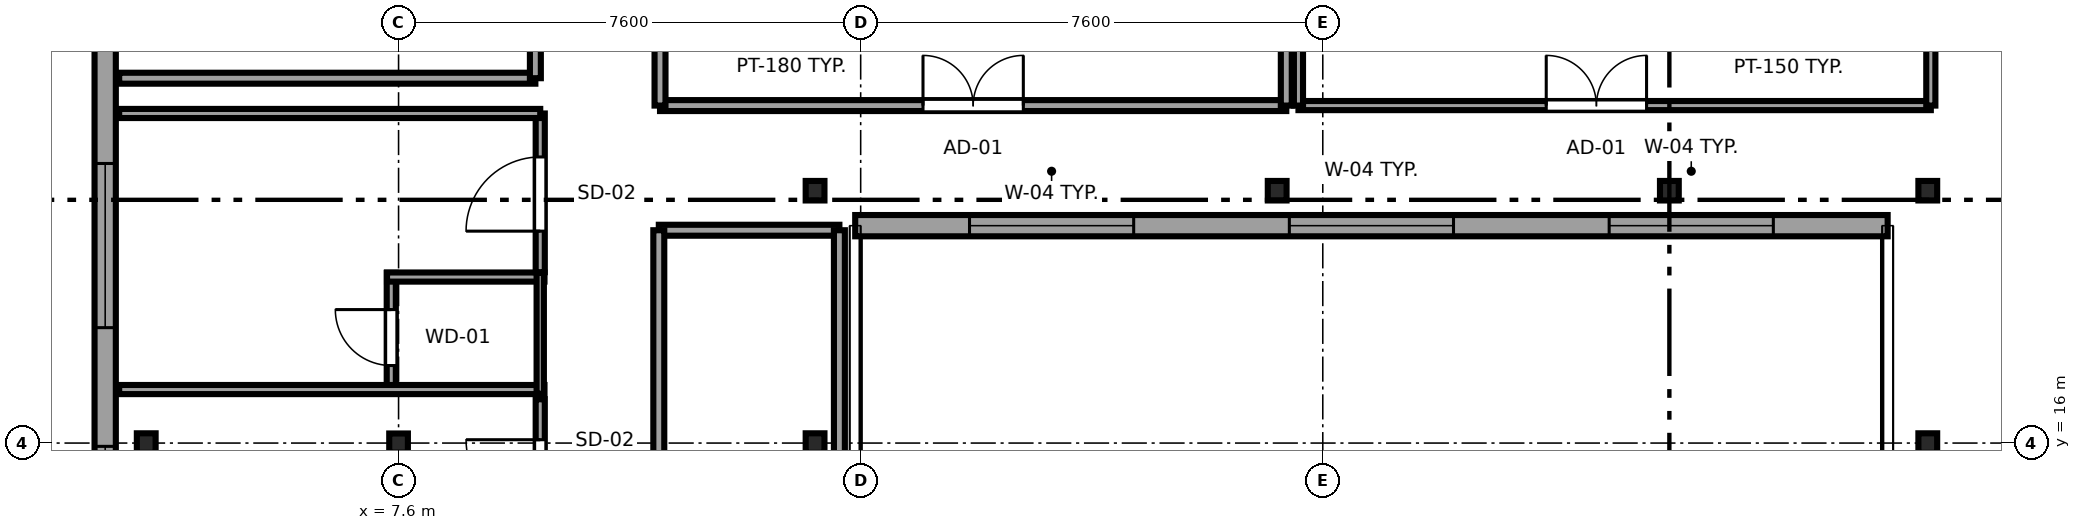
"""IFC4 building model, lengths in metres.
Left out: names, types, materials, properties, quantities, classifications, styles, units other than length and angle.
Written with IfcOpenShell. Run it as: python <this file> out.ifc"""

import sys

from ifc_helpers import new_model, si_unit, direction, frame, frame_2d, origin, origin_2d, place, context, subcontext, project, spatial, rectangle, i_section, extrude, source, transform, mapped, element, fill, save


model = new_model("IFC4")
c1 = context("Model", 3, precision=1e-05, world=origin(), true_north=direction((0.0, 1.0)))
c2 = subcontext(c1, "Body", "Model", "MODEL_VIEW")
j1 = project(units=[si_unit("LENGTHUNIT", "METRE"), si_unit("PLANEANGLEUNIT", "RADIAN")], contexts=[c1])
p1 = place(None, origin())
s1 = spatial("IfcSite", under=j1, at=p1, CompositionType="ELEMENT")
p2 = place(p1, origin())
s2 = spatial("IfcBuilding", under=s1, at=p2, CompositionType="ELEMENT")
p3 = place(p2, frame((0.0, 0.0, 245.2)))
s3 = spatial("IfcBuildingStorey", under=s2, at=p3, CompositionType="ELEMENT", Elevation=245.2)
m1 = source(origin(), c2, "Body", "SweptSolid", [
    extrude(i_section(OverallWidth=0.309, OverallDepth=0.321, WebThickness=0.014, FlangeThickness=0.022, FilletRadius=0.017, at=origin_2d()), origin(), (0.0, 0.0, 1.0), 3.55),
])
p4 = place(p3, frame((3.45, 16.0, 0.0), z_axis=(0.0, 0.0, 1.0), x_axis=(1.0, 0.0, 0.0)))
e1 = element("IfcColumn", 1, at=p4, inside=s3, PredefinedType="COLUMN", context=c2, shape_type="MappedRepresentation", body=[
    mapped(m1, transform((0.0, 0.0, 0.0), x_axis=(1.0, 0.0, 0.0), y_axis=(0.0, 1.0, 0.0), z_axis=(0.0, 0.0, 1.0), scale=1.0)),
])
m2 = source(origin(), c2, "Body", "SweptSolid", [
    extrude(i_section(OverallWidth=0.307, OverallDepth=0.315, WebThickness=0.012, FlangeThickness=0.019, FilletRadius=0.017, at=origin_2d()), origin(), (0.0, 0.0, 1.0), 3.55),
])
p5 = place(p3, frame((7.6, 16.0, 0.0), z_axis=(0.0, 0.0, 1.0), x_axis=(1.0, 0.0, 0.0)))
e2 = element("IfcColumn", 2, at=p5, inside=s3, PredefinedType="COLUMN", context=c2, shape_type="MappedRepresentation", body=[
    mapped(m2, transform((0.0, 0.0, 0.0), x_axis=(1.0, 0.0, 0.0), y_axis=(0.0, 1.0, 0.0), z_axis=(0.0, 0.0, 1.0), scale=1.0)),
])
for number, where, z_axis, x_axis in (
    (3, (14.45, 16.0, 0.0), (0.0, 0.0, 1.0), (1.0, 0.0, 0.0)),
    (4, (32.75, 16.0, 0.0), (0.0, 0.0, 1.0), (1.0, 0.0, 0.0)),
    (5, (14.45, 20.15, 0.0), (0.0, 0.0, 1.0), (1.0, 0.0, 0.0)),
    (6, (22.05, 20.15, 0.0), (0.0, 0.0, 1.0), (1.0, 0.0, 0.0)),
    (7, (28.5, 20.15, 0.0), (0.0, 0.0, 1.0), (1.0, 0.0, 0.0)),
    (8, (32.75, 20.15, 0.0), (0.0, 0.0, 1.0), (1.0, 0.0, 0.0)),
):
    element("IfcColumn", number, at=place(p3, frame(where, z_axis=z_axis, x_axis=x_axis)), inside=s3, PredefinedType="COLUMN", context=c2, shape_type="MappedRepresentation", body=[
        mapped(m1, transform((0.0, 0.0, 0.0), x_axis=(1.0, 0.0, 0.0), y_axis=(0.0, 1.0, 0.0), z_axis=(0.0, 0.0, 1.0), scale=1.0)),
    ])
p6 = place(p3, frame((15.11, 19.575, 0.0), z_axis=(0.0, 0.0, 1.0), x_axis=(1.0, 0.0, 0.0)))
e9 = element("IfcWall", 9, at=p6, inside=s3, PredefinedType="SOLIDWALL", context=c2, shape_type="SweptSolid", body=[
    extrude(rectangle(XDim=16.98, YDim=0.35, at=frame_2d((8.49, 0.0))), origin(), (0.0, 0.0, 1.0), 3.37),
])
p7 = place(p6, frame((1.88, 0.0, 0.68)))
e10 = element("IfcOpeningElement", 10, at=p7, cuts=e9, PredefinedType="OPENING", context=c2, shape_type="SweptSolid", body=[
    extrude(rectangle(XDim=2.7, YDim=1.95, at=frame_2d((1.35, 0.975))), frame((0.0, 0.185, 0.0), z_axis=(0.0, -1.0, 0.0), x_axis=(1.0, 0.0, 0.0)), (0.0, 0.0, 1.0), 0.37),
])
p8 = place(p6, frame((7.14, 0.0, 0.68)))
e11 = element("IfcOpeningElement", 11, at=p8, cuts=e9, PredefinedType="OPENING", context=c2, shape_type="SweptSolid", body=[
    extrude(rectangle(XDim=2.7, YDim=1.95, at=frame_2d((1.35, 0.975))), frame((0.0, 0.185, 0.0), z_axis=(0.0, -1.0, 0.0), x_axis=(1.0, 0.0, 0.0)), (0.0, 0.0, 1.0), 0.37),
])
p9 = place(p6, frame((12.4, 0.0, 0.68)))
e12 = element("IfcOpeningElement", 12, at=p9, cuts=e9, PredefinedType="OPENING", context=c2, shape_type="SweptSolid", body=[
    extrude(rectangle(XDim=2.7, YDim=1.95, at=frame_2d((1.35, 0.975))), frame((0.0, 0.185, 0.0), z_axis=(0.0, -1.0, 0.0), x_axis=(1.0, 0.0, 0.0)), (0.0, 0.0, 1.0), 0.37),
])
p10 = place(p3, frame((2.775, 40.783, 0.0), z_axis=(0.0, 0.0, 1.0), x_axis=(0.0, -1.0, 0.0)))
e13 = element("IfcWall", 13, at=p10, inside=s3, PredefinedType="SOLIDWALL", context=c2, shape_type="SweptSolid", body=[
    extrude(rectangle(XDim=33.766, YDim=0.35, at=frame_2d((16.883, 0.0))), origin(), (0.0, 0.0, 1.0), 3.37),
])
p11 = place(p10, frame((1.576, 0.0, 0.68)))
e14 = element("IfcOpeningElement", 14, at=p11, cuts=e13, PredefinedType="OPENING", context=c2, shape_type="SweptSolid", body=[
    extrude(rectangle(XDim=2.7, YDim=1.95, at=frame_2d((1.35, 0.975))), frame((0.0, 0.185, 0.0), z_axis=(0.0, -1.0, 0.0), x_axis=(1.0, 0.0, 0.0)), (0.0, 0.0, 1.0), 0.37),
])
p12 = place(p10, frame((6.228, 0.0, 0.68)))
e15 = element("IfcOpeningElement", 15, at=p12, cuts=e13, PredefinedType="OPENING", context=c2, shape_type="SweptSolid", body=[
    extrude(rectangle(XDim=2.7, YDim=1.95, at=frame_2d((1.35, 0.975))), frame((0.0, 0.185, 0.0), z_axis=(0.0, -1.0, 0.0), x_axis=(1.0, 0.0, 0.0)), (0.0, 0.0, 1.0), 0.37),
])
p13 = place(p10, frame((11.431, 0.0, 0.68)))
e16 = element("IfcOpeningElement", 16, at=p13, cuts=e13, PredefinedType="OPENING", context=c2, shape_type="SweptSolid", body=[
    extrude(rectangle(XDim=2.7, YDim=1.95, at=frame_2d((1.35, 0.975))), frame((0.0, 0.185, 0.0), z_axis=(0.0, -1.0, 0.0), x_axis=(1.0, 0.0, 0.0)), (0.0, 0.0, 1.0), 0.37),
])
p14 = place(p10, frame((15.533, 0.0, 0.68)))
e17 = element("IfcOpeningElement", 17, at=p14, cuts=e13, PredefinedType="OPENING", context=c2, shape_type="SweptSolid", body=[
    extrude(rectangle(XDim=2.7, YDim=1.95, at=frame_2d((1.35, 0.975))), frame((0.0, 0.185, 0.0), z_axis=(0.0, -1.0, 0.0), x_axis=(1.0, 0.0, 0.0)), (0.0, 0.0, 1.0), 0.37),
])
p15 = place(p10, frame((20.185, 0.0, 0.68)))
e18 = element("IfcOpeningElement", 18, at=p15, cuts=e13, PredefinedType="OPENING", context=c2, shape_type="SweptSolid", body=[
    extrude(rectangle(XDim=2.7, YDim=1.95, at=frame_2d((1.35, 0.975))), frame((0.0, 0.185, 0.0), z_axis=(0.0, -1.0, 0.0), x_axis=(1.0, 0.0, 0.0)), (0.0, 0.0, 1.0), 0.37),
])
p16 = place(p10, frame((24.837, 0.0, 0.68)))
e19 = element("IfcOpeningElement", 19, at=p16, cuts=e13, PredefinedType="OPENING", context=c2, shape_type="SweptSolid", body=[
    extrude(rectangle(XDim=2.7, YDim=1.95, at=frame_2d((1.35, 0.975))), frame((0.0, 0.185, 0.0), z_axis=(0.0, -1.0, 0.0), x_axis=(1.0, 0.0, 0.0)), (0.0, 0.0, 1.0), 0.37),
])
p17 = place(p10, frame((29.489, 0.0, 0.68)))
e20 = element("IfcOpeningElement", 20, at=p17, cuts=e13, PredefinedType="OPENING", context=c2, shape_type="SweptSolid", body=[
    extrude(rectangle(XDim=2.7, YDim=1.95, at=frame_2d((1.35, 0.975))), frame((0.0, 0.185, 0.0), z_axis=(0.0, -1.0, 0.0), x_axis=(1.0, 0.0, 0.0)), (0.0, 0.0, 1.0), 0.37),
])
p18 = place(p3, frame((7.48, 16.81, 0.0), z_axis=(0.0, 0.0, 1.0), x_axis=(0.0, 1.0, 0.0)))
e21 = element("IfcWall", 21, at=p18, inside=s3, PredefinedType="PARTITIONING", context=c2, shape_type="SweptSolid", body=[
    extrude(rectangle(XDim=1.99, YDim=0.15, at=frame_2d((0.995, 0.0))), origin(), (0.0, 0.0, 1.0), 2.827),
])
p19 = place(p18, frame((0.465, 0.0, 0.0)))
e22 = element("IfcOpeningElement", 22, at=p19, cuts=e21, PredefinedType="OPENING", context=c2, shape_type="SweptSolid", body=[
    extrude(rectangle(XDim=0.92, YDim=2.01, at=frame_2d((0.46, 1.005))), frame((0.0, 0.085, 0.0), z_axis=(0.0, -1.0, 0.0), x_axis=(1.0, 0.0, 0.0)), (0.0, 0.0, 1.0), 0.17),
])
p20 = place(p3, frame((3.005, 16.88, 0.0), z_axis=(0.0, 0.0, 1.0), x_axis=(1.0, 0.0, 0.0)))
e23 = element("IfcWall", 23, at=p20, inside=s3, PredefinedType="PARTITIONING", context=c2, shape_type="SweptSolid", body=[
    extrude(rectangle(XDim=6.995, YDim=0.15, at=frame_2d((3.498, 0.0))), origin(), (0.0, 0.0, 1.0), 3.37),
])
p21 = place(p3, frame((7.41, 18.73, 0.0), z_axis=(0.0, 0.0, 1.0), x_axis=(1.0, 0.0, 0.0)))
e24 = element("IfcWall", 24, at=p21, inside=s3, PredefinedType="PARTITIONING", context=c2, shape_type="SweptSolid", body=[
    extrude(rectangle(XDim=2.59, YDim=0.15, at=frame_2d((1.295, 0.0))), origin(), (0.0, 0.0, 1.0), 3.37),
])
p22 = place(p3, frame((9.93, 16.81, 0.0), z_axis=(0.0, 0.0, 1.0), x_axis=(0.0, 1.0, 0.0)))
e25 = element("IfcWall", 25, at=p22, inside=s3, PredefinedType="PLUMBINGWALL", context=c2, shape_type="SweptSolid", body=[
    extrude(rectangle(XDim=1.99, YDim=0.12, at=frame_2d((0.995, 0.0))), origin(), (0.0, 0.0, 1.0), 3.37),
])
p23 = place(p3, frame((9.93, 14.21, 0.0), z_axis=(0.0, 0.0, 1.0), x_axis=(0.0, 1.0, 0.0)))
e26 = element("IfcWall", 26, at=p23, inside=s3, PredefinedType="PARTITIONING", context=c2, shape_type="SweptSolid", body=[
    extrude(rectangle(XDim=2.51, YDim=0.15, at=frame_2d((1.255, 0.0))), origin(), (0.0, 0.0, 1.0), 3.37),
])
p24 = place(p23, frame((0.625, 0.0, 0.0)))
e27 = element("IfcOpeningElement", 27, at=p24, cuts=e26, PredefinedType="OPENING", context=c2, shape_type="SweptSolid", body=[
    extrude(rectangle(XDim=1.22, YDim=2.08, at=frame_2d((0.61, 1.04))), frame((0.0, 0.085, 0.0), z_axis=(0.0, -1.0, 0.0), x_axis=(1.0, 0.0, 0.0)), (0.0, 0.0, 1.0), 0.17),
])
p25 = place(p3, frame((9.93, 18.81, 0.0), z_axis=(0.0, 0.0, 1.0), x_axis=(0.0, 1.0, 0.0)))
e28 = element("IfcWall", 28, at=p25, inside=s3, PredefinedType="PARTITIONING", context=c2, shape_type="SweptSolid", body=[
    extrude(rectangle(XDim=2.61, YDim=0.15, at=frame_2d((1.305, 0.0))), origin(), (0.0, 0.0, 1.0), 3.37),
])
p26 = place(p25, frame((0.675, 0.0, 0.0)))
e29 = element("IfcOpeningElement", 29, at=p26, cuts=e28, PredefinedType="OPENING", context=c2, shape_type="SweptSolid", body=[
    extrude(rectangle(XDim=1.22, YDim=2.08, at=frame_2d((0.61, 1.04))), frame((0.0, 0.085, 0.0), z_axis=(0.0, -1.0, 0.0), x_axis=(1.0, 0.0, 0.0)), (0.0, 0.0, 1.0), 0.17),
])
p27 = place(p3, frame((3.005, 21.42, 0.0), z_axis=(0.0, 0.0, 1.0), x_axis=(1.0, 0.0, 0.0)))
e30 = element("IfcWall", 30, at=p27, inside=s3, PredefinedType="PARTITIONING", context=c2, shape_type="SweptSolid", body=[
    extrude(rectangle(XDim=6.925, YDim=0.15, at=frame_2d((3.462, 0.0))), origin(), (0.0, 0.0, 1.0), 3.37),
])
p28 = place(p3, frame((11.88, 19.5, 0.0), z_axis=(0.0, 0.0, 1.0), x_axis=(1.0, 0.0, 0.0)))
e31 = element("IfcWall", 31, at=p28, inside=s3, PredefinedType="PARTITIONING", context=c2, shape_type="SweptSolid", body=[
    extrude(rectangle(XDim=2.97, YDim=0.18, at=frame_2d((1.485, 0.0))), origin(), (0.0, 0.0, 1.0), 3.37),
])
p29 = place(p3, frame((11.88, 10.2, 0.0), z_axis=(0.0, 0.0, 1.0), x_axis=(0.0, 1.0, 0.0)))
e32 = element("IfcWall", 32, at=p29, inside=s3, PredefinedType="PARTITIONING", context=c2, shape_type="SweptSolid", body=[
    extrude(rectangle(XDim=9.3, YDim=0.18, at=frame_2d((4.65, 0.0))), origin(), (0.0, 0.0, 1.0), 3.37),
])
p30 = place(p29, frame((3.825, 0.0, 0.0)))
e33 = element("IfcOpeningElement", 33, at=p30, cuts=e32, PredefinedType="OPENING", context=c2, shape_type="SweptSolid", body=[
    extrude(rectangle(XDim=1.65, YDim=2.15, at=frame_2d((0.825, 1.075))), frame((0.0, 0.1, 0.0), z_axis=(0.0, -1.0, 0.0), x_axis=(1.0, 0.0, 0.0)), (0.0, 0.0, 1.0), 0.2),
])
p31 = place(p3, frame((14.85, 10.2, 0.0), z_axis=(0.0, 0.0, 1.0), x_axis=(0.0, 1.0, 0.0)))
e34 = element("IfcWall", 34, at=p31, inside=s3, PredefinedType="PARTITIONING", context=c2, shape_type="SweptSolid", body=[
    extrude(rectangle(XDim=9.3, YDim=0.18, at=frame_2d((4.65, 0.0))), origin(), (0.0, 0.0, 1.0), 3.37),
])
p32 = place(p3, frame((11.9, 21.55, 0.0), z_axis=(0.0, 0.0, 1.0), x_axis=(1.0, 0.0, 0.0)))
e35 = element("IfcWall", 35, at=p32, inside=s3, PredefinedType="PARTITIONING", context=c2, shape_type="SweptSolid", body=[
    extrude(rectangle(XDim=10.3, YDim=0.18, at=frame_2d((5.15, 0.0))), origin(), (0.0, 0.0, 1.0), 3.37),
])
p33 = place(p32, frame((4.325, 0.0, 0.0)))
e36 = element("IfcOpeningElement", 36, at=p33, cuts=e35, PredefinedType="OPENING", context=c2, shape_type="SweptSolid", body=[
    extrude(rectangle(XDim=1.65, YDim=2.15, at=frame_2d((0.825, 1.075))), frame((0.0, 0.1, 0.0), z_axis=(0.0, -1.0, 0.0), x_axis=(1.0, 0.0, 0.0)), (0.0, 0.0, 1.0), 0.2),
])
p34 = place(p3, frame((11.9, 21.55, 0.0), z_axis=(0.0, 0.0, 1.0), x_axis=(0.0, 1.0, 0.0)))
e37 = element("IfcWall", 37, at=p34, inside=s3, PredefinedType="PARTITIONING", context=c2, shape_type="SweptSolid", body=[
    extrude(rectangle(XDim=8.15, YDim=0.18, at=frame_2d((4.075, 0.0))), origin(), (0.0, 0.0, 1.0), 3.37),
])
p35 = place(p3, frame((22.2, 21.55, 0.0), z_axis=(0.0, 0.0, 1.0), x_axis=(0.0, 1.0, 0.0)))
e38 = element("IfcWall", 38, at=p35, inside=s3, PredefinedType="PARTITIONING", context=c2, shape_type="SweptSolid", body=[
    extrude(rectangle(XDim=8.15, YDim=0.18, at=frame_2d((4.075, 0.0))), origin(), (0.0, 0.0, 1.0), 2.827),
])
p36 = place(p3, frame((22.4, 21.55, 0.0), z_axis=(0.0, 0.0, 1.0), x_axis=(1.0, 0.0, 0.0)))
e39 = element("IfcWall", 39, at=p36, inside=s3, PredefinedType="PARTITIONING", context=c2, shape_type="SweptSolid", body=[
    extrude(rectangle(XDim=10.4, YDim=0.15, at=frame_2d((5.2, 0.0))), origin(), (0.0, 0.0, 1.0), 3.37),
])
p37 = place(p36, frame((4.075, 0.0, 0.0)))
e40 = element("IfcOpeningElement", 40, at=p37, cuts=e39, PredefinedType="OPENING", context=c2, shape_type="SweptSolid", body=[
    extrude(rectangle(XDim=1.65, YDim=2.15, at=frame_2d((0.825, 1.075))), frame((0.0, 0.085, 0.0), z_axis=(0.0, -1.0, 0.0), x_axis=(1.0, 0.0, 0.0)), (0.0, 0.0, 1.0), 0.17),
])
p38 = place(p3, frame((22.4, 21.55, 0.0), z_axis=(0.0, 0.0, 1.0), x_axis=(0.0, 1.0, 0.0)))
e41 = element("IfcWall", 41, at=p38, inside=s3, PredefinedType="PARTITIONING", context=c2, shape_type="SweptSolid", body=[
    extrude(rectangle(XDim=8.15, YDim=0.15, at=frame_2d((4.075, 0.0))), origin(), (0.0, 0.0, 1.0), 3.37),
])
p39 = place(p3, frame((32.8, 21.55, 0.0), z_axis=(0.0, 0.0, 1.0), x_axis=(0.0, 1.0, 0.0)))
e42 = element("IfcWall", 42, at=p39, inside=s3, PredefinedType="PARTITIONING", context=c2, shape_type="SweptSolid", body=[
    extrude(rectangle(XDim=8.15, YDim=0.15, at=frame_2d((4.075, 0.0))), origin(), (0.0, 0.0, 1.0), 2.827),
])
p40 = place(p3, frame((3.005, 22.0, 0.0), z_axis=(0.0, 0.0, 1.0), x_axis=(1.0, 0.0, 0.0)))
e43 = element("IfcWall", 43, at=p40, inside=s3, PredefinedType="PARTITIONING", context=c2, shape_type="SweptSolid", body=[
    extrude(rectangle(XDim=6.845, YDim=0.18, at=frame_2d((3.423, 0.0))), origin(), (0.0, 0.0, 1.0), 3.37),
])
p41 = place(p3, frame((9.85, 22.0, 0.0), z_axis=(0.0, 0.0, 1.0), x_axis=(0.0, 1.0, 0.0)))
e44 = element("IfcWall", 44, at=p41, inside=s3, PredefinedType="PARTITIONING", context=c2, shape_type="SweptSolid", body=[
    extrude(rectangle(XDim=4.3, YDim=0.18, at=frame_2d((2.15, 0.0))), origin(), (0.0, 0.0, 1.0), 3.37),
])
p42 = place(p41, frame((1.325, 0.0, 0.0)))
e45 = element("IfcOpeningElement", 45, at=p42, cuts=e44, PredefinedType="OPENING", context=c2, shape_type="SweptSolid", body=[
    extrude(rectangle(XDim=1.65, YDim=2.15, at=frame_2d((0.825, 1.075))), frame((0.0, 0.1, 0.0), z_axis=(0.0, -1.0, 0.0), x_axis=(1.0, 0.0, 0.0)), (0.0, 0.0, 1.0), 0.2),
])
m3 = source(origin(), c2, "Body", "SweptSolid", [
    extrude(rectangle(XDim=2.7, YDim=1.95, at=frame_2d((1.35, 0.975))), frame((0.0, 0.09, 0.0), z_axis=(0.0, -1.0, 0.0), x_axis=(1.0, 0.0, 0.0)), (0.0, 0.0, 1.0), 0.06),
])
p43 = place(p7, origin())
e46 = element("IfcWindow", 46, at=p43, inside=s3, PartitioningType="TRIPLE_PANEL_HORIZONTAL", PredefinedType="WINDOW", context=c2, shape_type="MappedRepresentation", body=[
    mapped(m3, transform((0.0, 0.0, 0.0), x_axis=(1.0, 0.0, 0.0), y_axis=(0.0, 1.0, 0.0), z_axis=(0.0, 0.0, 1.0), scale=1.0)),
])
fill(e10, e46)
p44 = place(p8, origin())
e47 = element("IfcWindow", 47, at=p44, inside=s3, PartitioningType="TRIPLE_PANEL_HORIZONTAL", PredefinedType="WINDOW", context=c2, shape_type="MappedRepresentation", body=[
    mapped(m3, transform((0.0, 0.0, 0.0), x_axis=(1.0, 0.0, 0.0), y_axis=(0.0, 1.0, 0.0), z_axis=(0.0, 0.0, 1.0), scale=1.0)),
])
fill(e11, e47)
p45 = place(p9, origin())
e48 = element("IfcWindow", 48, at=p45, inside=s3, PartitioningType="TRIPLE_PANEL_HORIZONTAL", PredefinedType="WINDOW", context=c2, shape_type="MappedRepresentation", body=[
    mapped(m3, transform((0.0, 0.0, 0.0), x_axis=(1.0, 0.0, 0.0), y_axis=(0.0, 1.0, 0.0), z_axis=(0.0, 0.0, 1.0), scale=1.0)),
])
fill(e12, e48)
p46 = place(p15, origin())
e49 = element("IfcWindow", 49, at=p46, inside=s3, PartitioningType="TRIPLE_PANEL_HORIZONTAL", PredefinedType="WINDOW", context=c2, shape_type="MappedRepresentation", body=[
    mapped(m3, transform((0.0, 0.0, 0.0), x_axis=(1.0, 0.0, 0.0), y_axis=(0.0, 1.0, 0.0), z_axis=(0.0, 0.0, 1.0), scale=1.0)),
])
fill(e18, e49)
p47 = place(p16, origin())
e50 = element("IfcWindow", 50, at=p47, inside=s3, PartitioningType="TRIPLE_PANEL_HORIZONTAL", PredefinedType="WINDOW", context=c2, shape_type="MappedRepresentation", body=[
    mapped(m3, transform((0.0, 0.0, 0.0), x_axis=(1.0, 0.0, 0.0), y_axis=(0.0, 1.0, 0.0), z_axis=(0.0, 0.0, 1.0), scale=1.0)),
])
fill(e19, e50)
m4 = source(origin(), c2, "Body", "SweptSolid", [
    extrude(rectangle(XDim=0.92, YDim=2.01, at=frame_2d((0.46, 1.005))), frame((0.0, 0.025, 0.0), z_axis=(0.0, -1.0, 0.0), x_axis=(1.0, 0.0, 0.0)), (0.0, 0.0, 1.0), 0.05),
])
p48 = place(p19, origin())
e51 = element("IfcDoor", 51, at=p48, inside=s3, OperationType="SINGLE_SWING_RIGHT", PredefinedType="DOOR", context=c2, shape_type="MappedRepresentation", body=[
    mapped(m4, transform((0.0, 0.0, 0.0), x_axis=(1.0, 0.0, 0.0), y_axis=(0.0, 1.0, 0.0), z_axis=(0.0, 0.0, 1.0), scale=1.0)),
])
fill(e22, e51)
m5 = source(origin(), c2, "Body", "SweptSolid", [
    extrude(rectangle(XDim=1.22, YDim=2.08, at=frame_2d((0.61, 1.04))), frame((0.0, 0.025, 0.0), z_axis=(0.0, -1.0, 0.0), x_axis=(1.0, 0.0, 0.0)), (0.0, 0.0, 1.0), 0.05),
])
p49 = place(p24, origin())
e52 = element("IfcDoor", 52, at=p49, inside=s3, OperationType="SINGLE_SWING_RIGHT", PredefinedType="DOOR", context=c2, shape_type="MappedRepresentation", body=[
    mapped(m5, transform((0.0, 0.0, 0.0), x_axis=(1.0, 0.0, 0.0), y_axis=(0.0, 1.0, 0.0), z_axis=(0.0, 0.0, 1.0), scale=1.0)),
])
fill(e27, e52)
p50 = place(p26, origin())
e53 = element("IfcDoor", 53, at=p50, inside=s3, OperationType="SINGLE_SWING_LEFT", PredefinedType="DOOR", context=c2, shape_type="MappedRepresentation", body=[
    mapped(m5, transform((0.0, 0.0, 0.0), x_axis=(1.0, 0.0, 0.0), y_axis=(0.0, 1.0, 0.0), z_axis=(0.0, 0.0, 1.0), scale=1.0)),
])
fill(e29, e53)
m6 = source(origin(), c2, "Body", "SweptSolid", [
    extrude(rectangle(XDim=1.65, YDim=2.15, at=frame_2d((0.825, 1.075))), frame((0.0, 0.025, 0.0), z_axis=(0.0, -1.0, 0.0), x_axis=(1.0, 0.0, 0.0)), (0.0, 0.0, 1.0), 0.05),
])
p51 = place(p33, origin())
e54 = element("IfcDoor", 54, at=p51, inside=s3, OperationType="DOUBLE_DOOR_SINGLE_SWING", PredefinedType="DOOR", context=c2, shape_type="MappedRepresentation", body=[
    mapped(m6, transform((0.0, 0.0, 0.0), x_axis=(1.0, 0.0, 0.0), y_axis=(0.0, 1.0, 0.0), z_axis=(0.0, 0.0, 1.0), scale=1.0)),
])
fill(e36, e54)
p52 = place(p37, origin())
e55 = element("IfcDoor", 55, at=p52, inside=s3, OperationType="DOUBLE_DOOR_SINGLE_SWING", PredefinedType="DOOR", context=c2, shape_type="MappedRepresentation", body=[
    mapped(m6, transform((0.0, 0.0, 0.0), x_axis=(1.0, 0.0, 0.0), y_axis=(0.0, 1.0, 0.0), z_axis=(0.0, 0.0, 1.0), scale=1.0)),
])
fill(e40, e55)
save(model, sys.argv[1])
